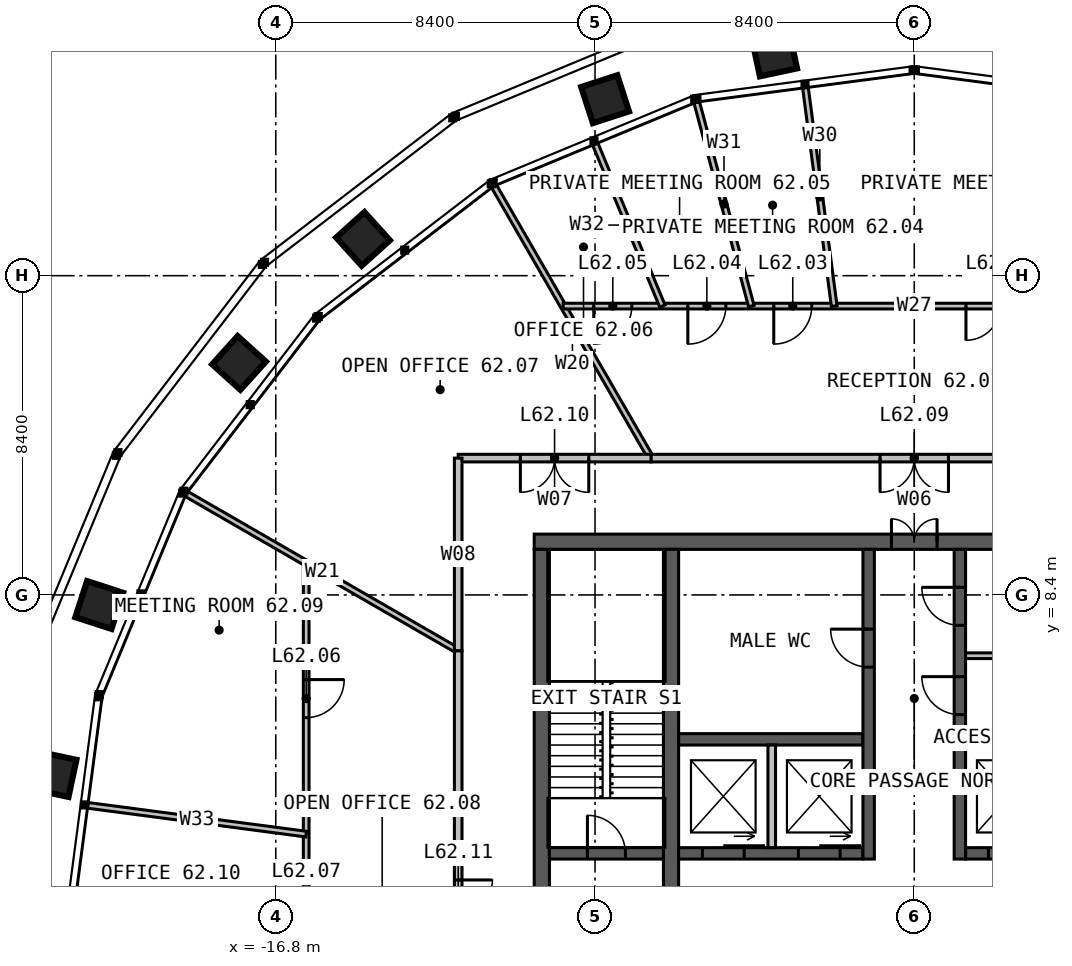
"""IFC4 building model, lengths in metres.
Left out: names, types, materials, properties, quantities, classifications, styles, units other than length and angle.
Written with IfcOpenShell. Run it as: python <this file> out.ifc"""

import sys

from ifc_helpers import new_model, si_unit, direction, frame, frame_2d, origin, place, context, subcontext, project, spatial, rectangle, extrude, element, fill, save


model = new_model("IFC4")
c1 = context("Model", 3, precision=1e-05, world=origin(), true_north=direction((0.0, 1.0)))
c2 = subcontext(c1, "Body", "Model", "MODEL_VIEW")
j1 = project(units=[si_unit("LENGTHUNIT", "METRE"), si_unit("PLANEANGLEUNIT", "RADIAN")], contexts=[c1])
p1 = place(None, origin())
s1 = spatial("IfcSite", under=j1, at=p1, CompositionType="ELEMENT")
p2 = place(p1, origin())
s2 = spatial("IfcBuilding", under=s1, at=p2, CompositionType="ELEMENT")
p3 = place(p2, frame((0.0, 0.0, 256.0)))
s3 = spatial("IfcBuildingStorey", under=s2, at=p3, CompositionType="ELEMENT", Elevation=256.0)
p4 = place(p3, frame((-10.0, 9.8, 0.0), z_axis=(0.0, 0.0, 1.0), x_axis=(1.0, 0.0, 0.0)))
e1 = element("IfcWall", 1, at=p4, inside=s3, PredefinedType="SOLIDWALL", context=c2, shape_type="SweptSolid", body=[
    extrude(rectangle(XDim=20.0, YDim=0.4, at=frame_2d((10.0, 0.0))), origin(), (0.0, 0.0, 1.0), 4.0),
])
p5 = place(p4, frame((9.4, 0.0, 0.0)))
e2 = element("IfcOpeningElement", 2, at=p5, cuts=e1, PredefinedType="OPENING", context=c2, shape_type="SweptSolid", body=[
    extrude(rectangle(XDim=1.2, YDim=2.2, at=frame_2d((0.6, 1.1))), frame((0.0, 0.21, 0.0), z_axis=(0.0, -1.0, 0.0), x_axis=(1.0, 0.0, 0.0)), (0.0, 0.0, 1.0), 0.42),
])
p6 = place(p3, frame((-9.8, 9.6, 0.0), z_axis=(0.0, 0.0, 1.0), x_axis=(0.0, -1.0, 0.0)))
e3 = element("IfcWall", 3, at=p6, inside=s3, PredefinedType="SOLIDWALL", context=c2, shape_type="SweptSolid", body=[
    extrude(rectangle(XDim=19.2, YDim=0.4, at=frame_2d((9.6, 0.0))), origin(), (0.0, 0.0, 1.0), 4.0),
])
p7 = place(p3, frame((-6.4, -9.6, 0.0), z_axis=(0.0, 0.0, 1.0), x_axis=(0.0, 1.0, 0.0)))
e4 = element("IfcWall", 4, at=p7, inside=s3, PredefinedType="SOLIDWALL", context=c2, shape_type="SweptSolid", body=[
    extrude(rectangle(XDim=19.2, YDim=0.4, at=frame_2d((9.6, 0.0))), origin(), (0.0, 0.0, 1.0), 4.0),
])
p8 = place(p7, frame((9.1, 0.0, 0.0)))
e5 = element("IfcOpeningElement", 5, at=p8, cuts=e4, PredefinedType="OPENING", context=c2, shape_type="SweptSolid", body=[
    extrude(rectangle(XDim=1.0, YDim=2.2, at=frame_2d((0.5, 1.1))), frame((0.0, 0.21, 0.0), z_axis=(0.0, -1.0, 0.0), x_axis=(1.0, 0.0, 0.0)), (0.0, 0.0, 1.0), 0.42),
])
p9 = place(p3, frame((-6.2, 1.6, 0.0), z_axis=(0.0, 0.0, 1.0), x_axis=(1.0, 0.0, 0.0)))
e6 = element("IfcWall", 6, at=p9, inside=s3, PredefinedType="SOLIDWALL", context=c2, shape_type="SweptSolid", body=[
    extrude(rectangle(XDim=4.85, YDim=0.3, at=frame_2d((2.425, 0.0))), origin(), (0.0, 0.0, 1.0), 4.0),
])
p10 = place(p9, frame((0.625, 0.0, 0.0)))
e7 = element("IfcOpeningElement", 7, at=p10, cuts=e6, PredefinedType="OPENING", context=c2, shape_type="SweptSolid", body=[
    extrude(rectangle(XDim=1.1, YDim=2.2, at=frame_2d((0.55, 1.1))), frame((0.0, 0.16, 0.0), z_axis=(0.0, -1.0, 0.0), x_axis=(1.0, 0.0, 0.0)), (0.0, 0.0, 1.0), 0.32),
])
p11 = place(p9, frame((3.15, 0.0, 0.0)))
e8 = element("IfcOpeningElement", 8, at=p11, cuts=e6, PredefinedType="OPENING", context=c2, shape_type="SweptSolid", body=[
    extrude(rectangle(XDim=1.1, YDim=2.2, at=frame_2d((0.55, 1.1))), frame((0.0, 0.16, 0.0), z_axis=(0.0, -1.0, 0.0), x_axis=(1.0, 0.0, 0.0)), (0.0, 0.0, 1.0), 0.32),
])
p12 = place(p3, frame((1.35, 1.6, 0.0), z_axis=(0.0, 0.0, 1.0), x_axis=(1.0, 0.0, 0.0)))
e9 = element("IfcWall", 9, at=p12, inside=s3, PredefinedType="SOLIDWALL", context=c2, shape_type="SweptSolid", body=[
    extrude(rectangle(XDim=4.85, YDim=0.3, at=frame_2d((2.425, 0.0))), origin(), (0.0, 0.0, 1.0), 4.0),
])
p13 = place(p12, frame((0.6, 0.0, 0.0)))
e10 = element("IfcOpeningElement", 10, at=p13, cuts=e9, PredefinedType="OPENING", context=c2, shape_type="SweptSolid", body=[
    extrude(rectangle(XDim=1.1, YDim=2.2, at=frame_2d((0.55, 1.1))), frame((0.0, 0.16, 0.0), z_axis=(0.0, -1.0, 0.0), x_axis=(1.0, 0.0, 0.0)), (0.0, 0.0, 1.0), 0.32),
])
p14 = place(p12, frame((3.125, 0.0, 0.0)))
e11 = element("IfcOpeningElement", 11, at=p14, cuts=e9, PredefinedType="OPENING", context=c2, shape_type="SweptSolid", body=[
    extrude(rectangle(XDim=1.1, YDim=2.2, at=frame_2d((0.55, 1.1))), frame((0.0, 0.16, 0.0), z_axis=(0.0, -1.0, 0.0), x_axis=(1.0, 0.0, 0.0)), (0.0, 0.0, 1.0), 0.32),
])
for number, where, z_axis, x_axis in (
    (12, (-6.2, 4.6, 0.0), (0.0, 0.0, 1.0), (1.0, 0.0, 0.0)),
    (13, (1.35, 4.6, 0.0), (0.0, 0.0, 1.0), (1.0, 0.0, 0.0)),
):
    element("IfcWall", number, at=place(p3, frame(where, z_axis=z_axis, x_axis=x_axis)), inside=s3, PredefinedType="SOLIDWALL", context=c2, shape_type="SweptSolid", body=[
        extrude(rectangle(XDim=4.85, YDim=0.3, at=frame_2d((2.425, 0.0))), origin(), (0.0, 0.0, 1.0), 4.0),
    ])
p15 = place(p3, frame((-1.2, 1.45, 0.0), z_axis=(0.0, 0.0, 1.0), x_axis=(0.0, 1.0, 0.0)))
e14 = element("IfcWall", 14, at=p15, inside=s3, PredefinedType="SOLIDWALL", context=c2, shape_type="SweptSolid", body=[
    extrude(rectangle(XDim=8.15, YDim=0.3, at=frame_2d((4.075, 0.0))), origin(), (0.0, 0.0, 1.0), 4.0),
])
p16 = place(p15, frame((5.05, 0.0, 0.0)))
e15 = element("IfcOpeningElement", 15, at=p16, cuts=e14, PredefinedType="OPENING", context=c2, shape_type="SweptSolid", body=[
    extrude(rectangle(XDim=1.0, YDim=2.2, at=frame_2d((0.5, 1.1))), frame((0.0, 0.16, 0.0), z_axis=(0.0, -1.0, 0.0), x_axis=(1.0, 0.0, 0.0)), (0.0, 0.0, 1.0), 0.32),
])
p17 = place(p3, frame((1.2, 1.45, 0.0), z_axis=(0.0, 0.0, 1.0), x_axis=(0.0, 1.0, 0.0)))
e16 = element("IfcWall", 16, at=p17, inside=s3, PredefinedType="SOLIDWALL", context=c2, shape_type="SweptSolid", body=[
    extrude(rectangle(XDim=8.15, YDim=0.3, at=frame_2d((4.075, 0.0))), origin(), (0.0, 0.0, 1.0), 4.0),
])
p18 = place(p17, frame((3.8, 0.0, 0.0)))
e17 = element("IfcOpeningElement", 17, at=p18, cuts=e16, PredefinedType="OPENING", context=c2, shape_type="SweptSolid", body=[
    extrude(rectangle(XDim=1.0, YDim=2.2, at=frame_2d((0.5, 1.1))), frame((0.0, 0.16, 0.0), z_axis=(0.0, -1.0, 0.0), x_axis=(1.0, 0.0, 0.0)), (0.0, 0.0, 1.0), 0.32),
])
p19 = place(p17, frame((6.15, 0.0, 0.0)))
e18 = element("IfcOpeningElement", 18, at=p19, cuts=e16, PredefinedType="OPENING", context=c2, shape_type="SweptSolid", body=[
    extrude(rectangle(XDim=1.0, YDim=2.2, at=frame_2d((0.5, 1.1))), frame((0.0, 0.16, 0.0), z_axis=(0.0, -1.0, 0.0), x_axis=(1.0, 0.0, 0.0)), (0.0, 0.0, 1.0), 0.32),
])
p20 = place(p3, frame((-9.6, 1.6, 0.0), z_axis=(0.0, 0.0, 1.0), x_axis=(1.0, 0.0, 0.0)))
e19 = element("IfcWall", 19, at=p20, inside=s3, PredefinedType="SOLIDWALL", context=c2, shape_type="SweptSolid", body=[
    extrude(rectangle(XDim=3.0, YDim=0.3, at=frame_2d((1.5, 0.0))), origin(), (0.0, 0.0, 1.0), 4.0),
])
p21 = place(p20, frame((1.0, 0.0, 0.0)))
e20 = element("IfcOpeningElement", 20, at=p21, cuts=e19, PredefinedType="OPENING", context=c2, shape_type="SweptSolid", body=[
    extrude(rectangle(XDim=1.0, YDim=2.2, at=frame_2d((0.5, 1.1))), frame((0.0, 0.16, 0.0), z_axis=(0.0, -1.0, 0.0), x_axis=(1.0, 0.0, 0.0)), (0.0, 0.0, 1.0), 0.32),
])
p22 = place(p3, frame((-3.75, 1.75, 0.0), z_axis=(0.0, 0.0, 1.0), x_axis=(0.0, 1.0, 0.0)))
e21 = element("IfcWall", 21, at=p22, inside=s3, PredefinedType="SOLIDWALL", context=c2, shape_type="SweptSolid", body=[
    extrude(rectangle(XDim=2.7, YDim=0.2, at=frame_2d((1.35, 0.0))), origin(), (0.0, 0.0, 1.0), 3.75),
])
p23 = place(p3, frame((1.35, 6.8, 0.0), z_axis=(0.0, 0.0, 1.0), x_axis=(1.0, 0.0, 0.0)))
e22 = element("IfcWall", 22, at=p23, inside=s3, PredefinedType="PARTITIONING", context=c2, shape_type="SweptSolid", body=[
    extrude(rectangle(XDim=4.85, YDim=0.15, at=frame_2d((2.425, 0.0))), origin(), (0.0, 0.0, 1.0), 3.75),
])
p24 = place(p23, frame((3.15, 0.0, 0.0)))
e23 = element("IfcOpeningElement", 23, at=p24, cuts=e22, PredefinedType="OPENING", context=c2, shape_type="SweptSolid", body=[
    extrude(rectangle(XDim=0.9, YDim=2.2, at=frame_2d((0.45, 1.1))), frame((0.0, 0.085, 0.0), z_axis=(0.0, -1.0, 0.0), x_axis=(1.0, 0.0, 0.0)), (0.0, 0.0, 1.0), 0.17),
])
for number, where, z_axis, x_axis in (
    (24, (-6.928, 12.0, 0.0), (0.0, 0.0, 1.0), (-0.5, 0.866, 0.0)),
    (25, (-12.0, 6.928, 0.0), (0.0, 0.0, 1.0), (-0.866, 0.5, 0.0)),
):
    element("IfcWall", number, at=place(p3, frame(where, z_axis=z_axis, x_axis=x_axis)), inside=s3, PredefinedType="PARTITIONING", context=c2, shape_type="SweptSolid", body=[
        extrude(rectangle(XDim=8.266, YDim=0.15, at=frame_2d((4.133, 0.0))), origin(), (0.0, 0.0, 1.0), 2.79),
    ])
p25 = place(p3, frame((9.238, 16.0, 0.0), z_axis=(0.0, 0.0, 1.0), x_axis=(-1.0, 0.0, 0.0)))
e26 = element("IfcWall", 26, at=p25, inside=s3, PredefinedType="PARTITIONING", context=c2, shape_type="SweptSolid", body=[
    extrude(rectangle(XDim=18.475, YDim=0.15, at=frame_2d((9.238, 0.0))), origin(), (0.0, 0.0, 1.0), 2.79),
])
p26 = place(p25, frame((0.805, 0.0, 0.0)))
e27 = element("IfcOpeningElement", 27, at=p26, cuts=e26, PredefinedType="OPENING", context=c2, shape_type="SweptSolid", body=[
    extrude(rectangle(XDim=1.0, YDim=2.2, at=frame_2d((0.5, 1.1))), frame((0.0, 0.085, 0.0), z_axis=(0.0, -1.0, 0.0), x_axis=(1.0, 0.0, 0.0)), (0.0, 0.0, 1.0), 0.17),
])
p27 = place(p25, frame((6.077, 0.0, 0.0)))
e28 = element("IfcOpeningElement", 28, at=p27, cuts=e26, PredefinedType="OPENING", context=c2, shape_type="SweptSolid", body=[
    extrude(rectangle(XDim=1.8, YDim=2.2, at=frame_2d((0.9, 1.1))), frame((0.0, 0.085, 0.0), z_axis=(0.0, -1.0, 0.0), x_axis=(1.0, 0.0, 0.0)), (0.0, 0.0, 1.0), 0.17),
])
p28 = place(p25, frame((11.934, 0.0, 0.0)))
e29 = element("IfcOpeningElement", 29, at=p28, cuts=e26, PredefinedType="OPENING", context=c2, shape_type="SweptSolid", body=[
    extrude(rectangle(XDim=1.0, YDim=2.2, at=frame_2d((0.5, 1.1))), frame((0.0, 0.085, 0.0), z_axis=(0.0, -1.0, 0.0), x_axis=(1.0, 0.0, 0.0)), (0.0, 0.0, 1.0), 0.17),
])
p29 = place(p25, frame((14.195, 0.0, 0.0)))
e30 = element("IfcOpeningElement", 30, at=p29, cuts=e26, PredefinedType="OPENING", context=c2, shape_type="SweptSolid", body=[
    extrude(rectangle(XDim=1.0, YDim=2.2, at=frame_2d((0.5, 1.1))), frame((0.0, 0.085, 0.0), z_axis=(0.0, -1.0, 0.0), x_axis=(1.0, 0.0, 0.0)), (0.0, 0.0, 1.0), 0.17),
])
p30 = place(p25, frame((16.67, 0.0, 0.0)))
e31 = element("IfcOpeningElement", 31, at=p30, cuts=e26, PredefinedType="OPENING", context=c2, shape_type="SweptSolid", body=[
    extrude(rectangle(XDim=1.0, YDim=2.2, at=frame_2d((0.5, 1.1))), frame((0.0, 0.085, 0.0), z_axis=(0.0, -1.0, 0.0), x_axis=(1.0, 0.0, 0.0)), (0.0, 0.0, 1.0), 0.17),
])
p31 = place(p3, frame((-2.106, 16.0, 0.0), z_axis=(0.0, 0.0, 1.0), x_axis=(-0.130518811488, 0.991445833038, 0.0)))
e32 = element("IfcWall", 32, at=p31, inside=s3, PredefinedType="PARTITIONING", context=c2, shape_type="SweptSolid", body=[
    extrude(rectangle(XDim=5.795, YDim=0.15, at=frame_2d((2.897, 0.0))), origin(), (0.0, 0.0, 1.0), 2.79),
])
p32 = place(p3, frame((-4.287, 16.0, 0.0), z_axis=(0.0, 0.0, 1.0), x_axis=(-0.25882171764, 0.965925110181, 0.0)))
e33 = element("IfcWall", 33, at=p32, inside=s3, PredefinedType="PARTITIONING", context=c2, shape_type="SweptSolid", body=[
    extrude(rectangle(XDim=5.558, YDim=0.15, at=frame_2d((2.779, 0.0))), origin(), (0.0, 0.0, 1.0), 2.79),
])
p33 = place(p3, frame((-6.627, 16.0, 0.0), z_axis=(0.0, 0.0, 1.0), x_axis=(-0.38266485266, 0.923887228258, 0.0)))
e34 = element("IfcWall", 34, at=p33, inside=s3, PredefinedType="PARTITIONING", context=c2, shape_type="SweptSolid", body=[
    extrude(rectangle(XDim=4.615, YDim=0.15, at=frame_2d((2.307, 0.0))), origin(), (0.0, 0.0, 1.0), 2.79),
])
p34 = place(p3, frame((6.928, 12.0, 0.0), z_axis=(0.0, 0.0, 1.0), x_axis=(-1.0, 0.0, 0.0)))
e35 = element("IfcWall", 35, at=p34, inside=s3, PredefinedType="PARTITIONING", context=c2, shape_type="SweptSolid", body=[
    extrude(rectangle(XDim=13.856, YDim=0.2, at=frame_2d((6.928, 0.0))), origin(), (0.0, 0.0, 1.0), 3.8),
])
p35 = place(p34, frame((6.028, 0.0, 0.0)))
e36 = element("IfcOpeningElement", 36, at=p35, cuts=e35, PredefinedType="OPENING", context=c2, shape_type="SweptSolid", body=[
    extrude(rectangle(XDim=1.8, YDim=2.2, at=frame_2d((0.9, 1.1))), frame((0.0, 0.11, 0.0), z_axis=(0.0, -1.0, 0.0), x_axis=(1.0, 0.0, 0.0)), (0.0, 0.0, 1.0), 0.22),
])
p36 = place(p3, frame((-6.928, 12.0, 0.0), z_axis=(0.0, 0.0, 1.0), x_axis=(-1.0, 0.0, 0.0)))
e37 = element("IfcWall", 37, at=p36, inside=s3, PredefinedType="PARTITIONING", context=c2, shape_type="SweptSolid", body=[
    extrude(rectangle(XDim=5.072, YDim=0.2, at=frame_2d((2.536, 0.0))), origin(), (0.0, 0.0, 1.0), 3.8),
])
p37 = place(p36, frame((1.636, 0.0, 0.0)))
e38 = element("IfcOpeningElement", 38, at=p37, cuts=e37, PredefinedType="OPENING", context=c2, shape_type="SweptSolid", body=[
    extrude(rectangle(XDim=1.8, YDim=2.2, at=frame_2d((0.9, 1.1))), frame((0.0, 0.11, 0.0), z_axis=(0.0, -1.0, 0.0), x_axis=(1.0, 0.0, 0.0)), (0.0, 0.0, 1.0), 0.22),
])
p38 = place(p3, frame((-12.0, 12.0, 0.0), z_axis=(0.0, 0.0, 1.0), x_axis=(0.0, -1.0, 0.0)))
e39 = element("IfcWall", 39, at=p38, inside=s3, PredefinedType="PARTITIONING", context=c2, shape_type="SweptSolid", body=[
    extrude(rectangle(XDim=5.072, YDim=0.2, at=frame_2d((2.536, 0.0))), origin(), (0.0, 0.0, 1.0), 3.8),
])
p39 = place(p3, frame((-16.0, 9.238, 0.0), z_axis=(0.0, 0.0, 1.0), x_axis=(0.0, -1.0, 0.0)))
e40 = element("IfcWall", 40, at=p39, inside=s3, PredefinedType="PARTITIONING", context=c2, shape_type="SweptSolid", body=[
    extrude(rectangle(XDim=18.475, YDim=0.15, at=frame_2d((9.238, 0.0))), origin(), (0.0, 0.0, 1.0), 2.79),
])
p40 = place(p39, frame((3.066, 0.0, 0.0)))
e41 = element("IfcOpeningElement", 41, at=p40, cuts=e40, PredefinedType="OPENING", context=c2, shape_type="SweptSolid", body=[
    extrude(rectangle(XDim=1.0, YDim=2.2, at=frame_2d((0.5, 1.1))), frame((0.0, 0.085, 0.0), z_axis=(0.0, -1.0, 0.0), x_axis=(1.0, 0.0, 0.0)), (0.0, 0.0, 1.0), 0.17),
])
p41 = place(p39, frame((8.738, 0.0, 0.0)))
e42 = element("IfcOpeningElement", 42, at=p41, cuts=e40, PredefinedType="OPENING", context=c2, shape_type="SweptSolid", body=[
    extrude(rectangle(XDim=1.0, YDim=2.2, at=frame_2d((0.5, 1.1))), frame((0.0, 0.085, 0.0), z_axis=(0.0, -1.0, 0.0), x_axis=(1.0, 0.0, 0.0)), (0.0, 0.0, 1.0), 0.17),
])
p42 = place(p39, frame((14.41, 0.0, 0.0)))
e43 = element("IfcOpeningElement", 43, at=p42, cuts=e40, PredefinedType="OPENING", context=c2, shape_type="SweptSolid", body=[
    extrude(rectangle(XDim=1.0, YDim=2.2, at=frame_2d((0.5, 1.1))), frame((0.0, 0.085, 0.0), z_axis=(0.0, -1.0, 0.0), x_axis=(1.0, 0.0, 0.0)), (0.0, 0.0, 1.0), 0.17),
])
p43 = place(p3, frame((-16.0, 2.106, 0.0), z_axis=(0.0, 0.0, 1.0), x_axis=(-0.991445833038, 0.130518811488, 0.0)))
e44 = element("IfcWall", 44, at=p43, inside=s3, PredefinedType="PARTITIONING", context=c2, shape_type="SweptSolid", body=[
    extrude(rectangle(XDim=5.795, YDim=0.15, at=frame_2d((2.897, 0.0))), origin(), (0.0, 0.0, 1.0), 2.79),
])
p44 = place(p3, frame((-12.0, 6.928, 0.0), z_axis=(0.0, 0.0, 1.0), x_axis=(0.0, -1.0, 0.0)))
e45 = element("IfcWall", 45, at=p44, inside=s3, PredefinedType="PARTITIONING", context=c2, shape_type="SweptSolid", body=[
    extrude(rectangle(XDim=13.856, YDim=0.2, at=frame_2d((6.928, 0.0))), origin(), (0.0, 0.0, 1.0), 3.8),
])
p45 = place(p44, frame((6.028, 0.0, 0.0)))
e46 = element("IfcOpeningElement", 46, at=p45, cuts=e45, PredefinedType="OPENING", context=c2, shape_type="SweptSolid", body=[
    extrude(rectangle(XDim=1.8, YDim=2.2, at=frame_2d((0.9, 1.1))), frame((0.0, 0.11, 0.0), z_axis=(0.0, -1.0, 0.0), x_axis=(1.0, 0.0, 0.0)), (0.0, 0.0, 1.0), 0.22),
])
p46 = place(p5, origin())
e47 = element("IfcDoor", 47, at=p46, inside=s3, OperationType="DOUBLE_DOOR_SINGLE_SWING", PredefinedType="DOOR", context=c2, shape_type="SweptSolid", body=[
    extrude(rectangle(XDim=1.2, YDim=2.2, at=frame_2d((0.6, 1.1))), frame((0.0, 0.025, 0.0), z_axis=(0.0, -1.0, 0.0), x_axis=(1.0, 0.0, 0.0)), (0.0, 0.0, 1.0), 0.05),
])
fill(e2, e47)
p47 = place(p21, origin())
e48 = element("IfcDoor", 48, at=p47, inside=s3, OperationType="SINGLE_SWING_LEFT", PredefinedType="DOOR", context=c2, shape_type="SweptSolid", body=[
    extrude(rectangle(XDim=1.0, YDim=2.2, at=frame_2d((0.5, 1.1))), frame((0.0, 0.025, 0.0), z_axis=(0.0, -1.0, 0.0), x_axis=(1.0, 0.0, 0.0)), (0.0, 0.0, 1.0), 0.05),
])
fill(e20, e48)
p48 = place(p16, origin())
e49 = element("IfcDoor", 49, at=p48, inside=s3, OperationType="SINGLE_SWING_RIGHT", PredefinedType="DOOR", context=c2, shape_type="SweptSolid", body=[
    extrude(rectangle(XDim=1.0, YDim=2.2, at=frame_2d((0.5, 1.1))), frame((0.0, 0.025, 0.0), z_axis=(0.0, -1.0, 0.0), x_axis=(1.0, 0.0, 0.0)), (0.0, 0.0, 1.0), 0.05),
])
fill(e15, e49)
p49 = place(p18, origin())
e50 = element("IfcDoor", 50, at=p49, inside=s3, OperationType="SINGLE_SWING_RIGHT", PredefinedType="DOOR", context=c2, shape_type="SweptSolid", body=[
    extrude(rectangle(XDim=1.0, YDim=2.2, at=frame_2d((0.5, 1.1))), frame((0.0, 0.025, 0.0), z_axis=(0.0, -1.0, 0.0), x_axis=(1.0, 0.0, 0.0)), (0.0, 0.0, 1.0), 0.05),
])
fill(e17, e50)
p50 = place(p19, origin())
e51 = element("IfcDoor", 51, at=p50, inside=s3, OperationType="SINGLE_SWING_RIGHT", PredefinedType="DOOR", context=c2, shape_type="SweptSolid", body=[
    extrude(rectangle(XDim=1.0, YDim=2.2, at=frame_2d((0.5, 1.1))), frame((0.0, 0.025, 0.0), z_axis=(0.0, -1.0, 0.0), x_axis=(1.0, 0.0, 0.0)), (0.0, 0.0, 1.0), 0.05),
])
fill(e18, e51)
p51 = place(p10, origin())
e52 = element("IfcDoor", 52, at=p51, inside=s3, OperationType="SLIDING_TO_LEFT", PredefinedType="DOOR", context=c2, shape_type="SweptSolid", body=[
    extrude(rectangle(XDim=1.1, YDim=2.2, at=frame_2d((0.55, 1.1))), frame((0.0, 0.025, 0.0), z_axis=(0.0, -1.0, 0.0), x_axis=(1.0, 0.0, 0.0)), (0.0, 0.0, 1.0), 0.05),
])
fill(e7, e52)
p52 = place(p11, origin())
e53 = element("IfcDoor", 53, at=p52, inside=s3, OperationType="SLIDING_TO_LEFT", PredefinedType="DOOR", context=c2, shape_type="SweptSolid", body=[
    extrude(rectangle(XDim=1.1, YDim=2.2, at=frame_2d((0.55, 1.1))), frame((0.0, 0.025, 0.0), z_axis=(0.0, -1.0, 0.0), x_axis=(1.0, 0.0, 0.0)), (0.0, 0.0, 1.0), 0.05),
])
fill(e8, e53)
p53 = place(p13, origin())
e54 = element("IfcDoor", 54, at=p53, inside=s3, OperationType="SLIDING_TO_LEFT", PredefinedType="DOOR", context=c2, shape_type="SweptSolid", body=[
    extrude(rectangle(XDim=1.1, YDim=2.2, at=frame_2d((0.55, 1.1))), frame((0.0, 0.025, 0.0), z_axis=(0.0, -1.0, 0.0), x_axis=(1.0, 0.0, 0.0)), (0.0, 0.0, 1.0), 0.05),
])
fill(e10, e54)
p54 = place(p27, origin())
e55 = element("IfcDoor", 55, at=p54, inside=s3, OperationType="DOUBLE_DOOR_SINGLE_SWING", PredefinedType="DOOR", context=c2, shape_type="SweptSolid", body=[
    extrude(rectangle(XDim=1.8, YDim=2.2, at=frame_2d((0.9, 1.1))), frame((0.0, 0.025, 0.0), z_axis=(0.0, -1.0, 0.0), x_axis=(1.0, 0.0, 0.0)), (0.0, 0.0, 1.0), 0.05),
])
fill(e28, e55)
p55 = place(p28, origin())
e56 = element("IfcDoor", 56, at=p55, inside=s3, OperationType="SINGLE_SWING_RIGHT", PredefinedType="DOOR", context=c2, shape_type="SweptSolid", body=[
    extrude(rectangle(XDim=1.0, YDim=2.2, at=frame_2d((0.5, 1.1))), frame((0.0, 0.025, 0.0), z_axis=(0.0, -1.0, 0.0), x_axis=(1.0, 0.0, 0.0)), (0.0, 0.0, 1.0), 0.05),
])
fill(e29, e56)
p56 = place(p29, origin())
e57 = element("IfcDoor", 57, at=p56, inside=s3, OperationType="SINGLE_SWING_RIGHT", PredefinedType="DOOR", context=c2, shape_type="SweptSolid", body=[
    extrude(rectangle(XDim=1.0, YDim=2.2, at=frame_2d((0.5, 1.1))), frame((0.0, 0.025, 0.0), z_axis=(0.0, -1.0, 0.0), x_axis=(1.0, 0.0, 0.0)), (0.0, 0.0, 1.0), 0.05),
])
fill(e30, e57)
p57 = place(p30, origin())
e58 = element("IfcDoor", 58, at=p57, inside=s3, OperationType="SINGLE_SWING_RIGHT", PredefinedType="DOOR", context=c2, shape_type="SweptSolid", body=[
    extrude(rectangle(XDim=1.0, YDim=2.2, at=frame_2d((0.5, 1.1))), frame((0.0, 0.025, 0.0), z_axis=(0.0, -1.0, 0.0), x_axis=(1.0, 0.0, 0.0)), (0.0, 0.0, 1.0), 0.05),
])
fill(e31, e58)
p58 = place(p35, origin())
e59 = element("IfcDoor", 59, at=p58, inside=s3, OperationType="DOUBLE_DOOR_SINGLE_SWING", PredefinedType="DOOR", context=c2, shape_type="SweptSolid", body=[
    extrude(rectangle(XDim=1.8, YDim=2.2, at=frame_2d((0.9, 1.1))), frame((0.0, 0.025, 0.0), z_axis=(0.0, -1.0, 0.0), x_axis=(1.0, 0.0, 0.0)), (0.0, 0.0, 1.0), 0.05),
])
fill(e36, e59)
p59 = place(p37, origin())
e60 = element("IfcDoor", 60, at=p59, inside=s3, OperationType="DOUBLE_DOOR_SINGLE_SWING", PredefinedType="DOOR", context=c2, shape_type="SweptSolid", body=[
    extrude(rectangle(XDim=1.8, YDim=2.2, at=frame_2d((0.9, 1.1))), frame((0.0, 0.025, 0.0), z_axis=(0.0, -1.0, 0.0), x_axis=(1.0, 0.0, 0.0)), (0.0, 0.0, 1.0), 0.05),
])
fill(e38, e60)
p60 = place(p40, origin())
e61 = element("IfcDoor", 61, at=p60, inside=s3, OperationType="SINGLE_SWING_LEFT", PredefinedType="DOOR", context=c2, shape_type="SweptSolid", body=[
    extrude(rectangle(XDim=1.0, YDim=2.2, at=frame_2d((0.5, 1.1))), frame((0.0, 0.025, 0.0), z_axis=(0.0, -1.0, 0.0), x_axis=(1.0, 0.0, 0.0)), (0.0, 0.0, 1.0), 0.05),
])
fill(e41, e61)
p61 = place(p45, origin())
e62 = element("IfcDoor", 62, at=p61, inside=s3, OperationType="DOUBLE_DOOR_SINGLE_SWING", PredefinedType="DOOR", context=c2, shape_type="SweptSolid", body=[
    extrude(rectangle(XDim=1.8, YDim=2.2, at=frame_2d((0.9, 1.1))), frame((0.0, 0.025, 0.0), z_axis=(0.0, -1.0, 0.0), x_axis=(1.0, 0.0, 0.0)), (0.0, 0.0, 1.0), 0.05),
])
fill(e46, e62)
save(model, sys.argv[1])
